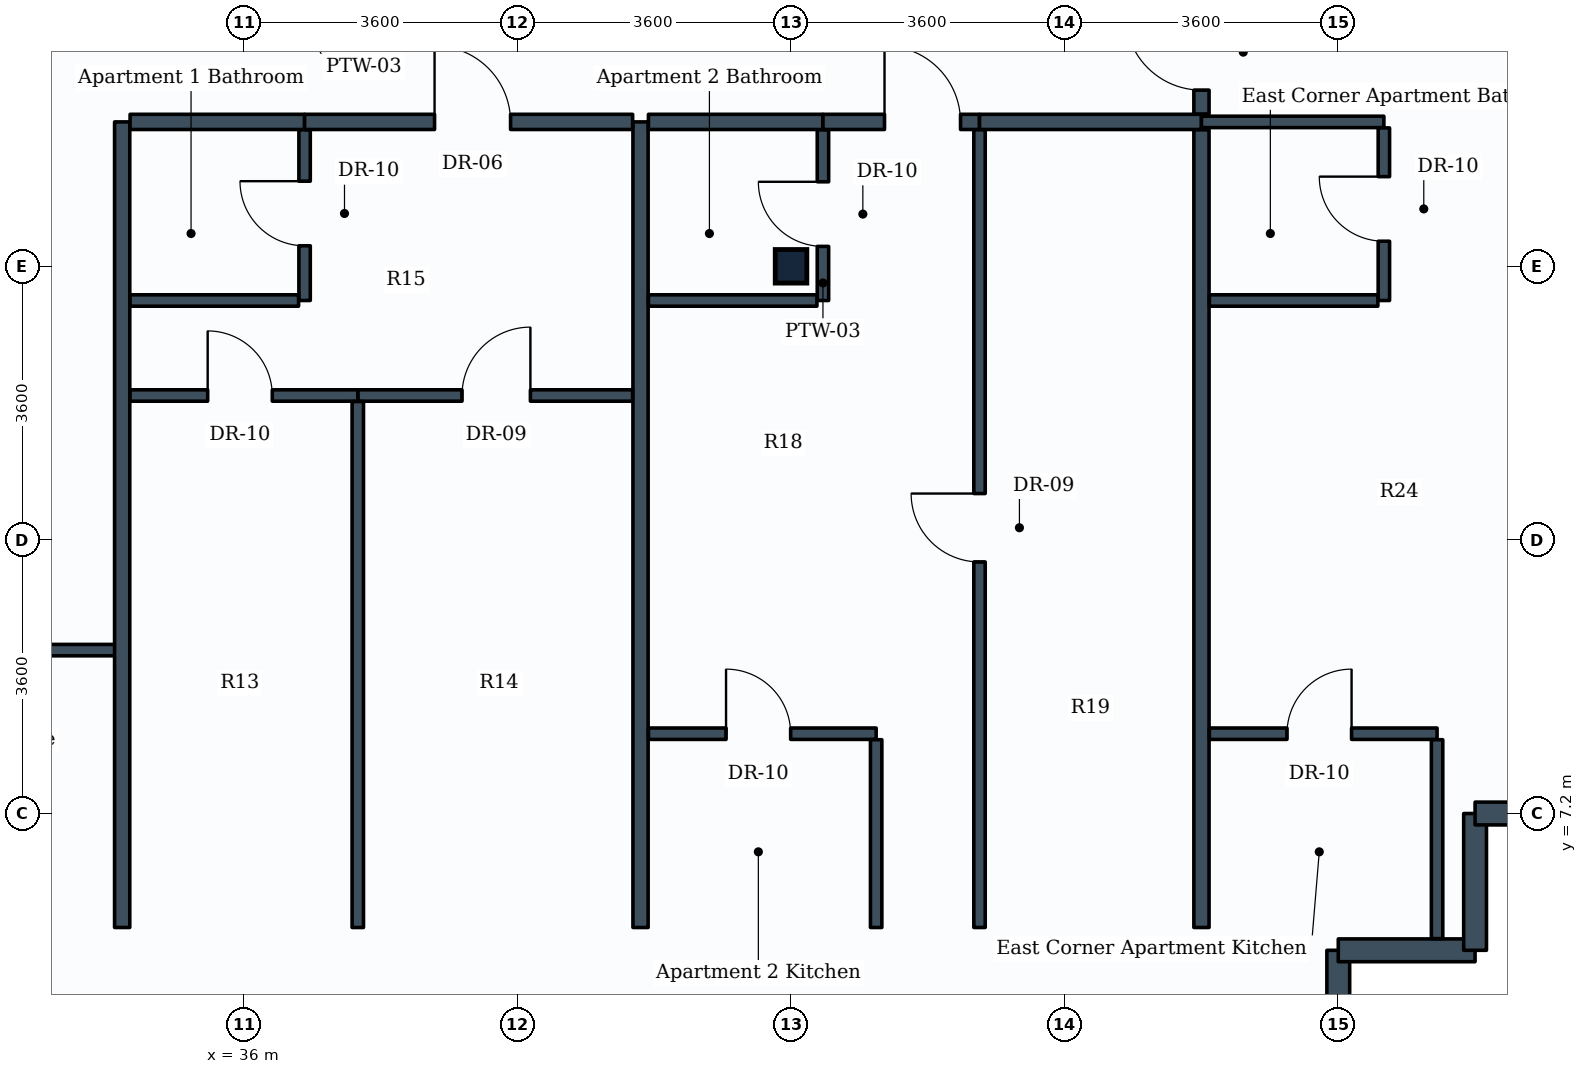
"""IFC4 building model, lengths in metres.
Left out: names, types, materials, properties, quantities, classifications, styles, units other than length and angle.
Written with IfcOpenShell. Run it as: python <this file> out.ifc"""

import sys

from ifc_helpers import new_model, si_unit, direction, frame, frame_2d, origin, origin_2d, place, context, subcontext, project, spatial, rectangle, i_section, extrude, element, fill, save


model = new_model("IFC4")
c1 = context("Model", 3, precision=1e-05, world=origin(), true_north=direction((0.0, 1.0)))
c2 = subcontext(c1, "Body", "Model", "MODEL_VIEW")
j1 = project(units=[si_unit("LENGTHUNIT", "METRE"), si_unit("PLANEANGLEUNIT", "RADIAN")], contexts=[c1])
p1 = place(None, origin())
s1 = spatial("IfcSite", under=j1, at=p1, CompositionType="ELEMENT")
p2 = place(p1, origin())
s2 = spatial("IfcBuilding", under=s1, at=p2, CompositionType="ELEMENT")
p3 = place(p2, frame((0.0, 0.0, 131.4)))
s3 = spatial("IfcBuildingStorey", under=s2, at=p3, CompositionType="ELEMENT", Elevation=131.4)
p4 = place(p3, frame((43.2, 14.4, 0.0), z_axis=(0.0, 0.0, 1.0), x_axis=(1.0, 0.0, 0.0)))
e1 = element("IfcColumn", 1, at=p4, inside=s3, PredefinedType="COLUMN", context=c2, shape_type="SweptSolid", body=[
    extrude(i_section(OverallWidth=0.416, OverallDepth=0.442, WebThickness=0.025, FlangeThickness=0.041, FilletRadius=0.015, at=origin_2d()), origin(), (0.0, 0.0, 1.0), 3.8),
])
p5 = place(p3, frame((50.4, 5.4, 0.0), z_axis=(0.0, 0.0, 1.0), x_axis=(0.0, -1.0, 0.0)))
e2 = element("IfcWall", 2, at=p5, inside=s3, PredefinedType="STANDARD", context=c2, shape_type="SweptSolid", body=[
    extrude(rectangle(XDim=1.8, YDim=0.3, at=frame_2d((0.9, 0.0))), origin(), (0.0, 0.0, 1.0), 2.93),
])
for number, where, z_axis, x_axis in (
    (3, (52.2, 5.4, 0.0), (0.0, 0.0, 1.0), (-1.0, 0.0, 0.0)),
    (4, (52.2, 7.2, 0.0), (0.0, 0.0, 1.0), (0.0, -1.0, 0.0)),
):
    element("IfcWall", number, at=place(p3, frame(where, z_axis=z_axis, x_axis=x_axis)), inside=s3, PredefinedType="STANDARD", context=c2, shape_type="SweptSolid", body=[
        extrude(rectangle(XDim=1.8, YDim=0.3, at=frame_2d((0.9, 0.0))), origin(), (0.0, 0.0, 1.0), 3.535),
    ])
p6 = place(p3, frame((54.0, 7.2, 0.0), z_axis=(0.0, 0.0, 1.0), x_axis=(-1.0, 0.0, 0.0)))
e5 = element("IfcWall", 5, at=p6, inside=s3, PredefinedType="STANDARD", context=c2, shape_type="SweptSolid", body=[
    extrude(rectangle(XDim=1.8, YDim=0.3, at=frame_2d((0.9, 0.0))), origin(), (0.0, 0.0, 1.0), 2.93),
])
p7 = place(p3, frame((28.879, 9.35, 0.0), z_axis=(0.0, 0.0, 1.0), x_axis=(1.0, 0.0, 0.0)))
e6 = element("IfcWall", 6, at=p7, inside=s3, PredefinedType="PARTITIONING", context=c2, shape_type="SweptSolid", body=[
    extrude(rectangle(XDim=5.521, YDim=0.15, at=frame_2d((2.76, 0.0))), origin(), (0.0, 0.0, 1.0), 3.535),
])
p8 = place(p7, frame((0.36, 0.0, 0.0)))
e7 = element("IfcOpeningElement", 7, at=p8, cuts=e6, PredefinedType="OPENING", context=c2, shape_type="SweptSolid", body=[
    extrude(rectangle(XDim=1.0, YDim=2.1, at=frame_2d((0.5, 1.05))), frame((0.0, 0.085, 0.0), z_axis=(0.0, -1.0, 0.0), x_axis=(1.0, 0.0, 0.0)), (0.0, 0.0, 1.0), 0.17),
])
p9 = place(p3, frame((34.4, 5.7, 0.0), z_axis=(0.0, 0.0, 1.0), x_axis=(0.0, 1.0, 0.0)))
e8 = element("IfcWall", 8, at=p9, inside=s3, PredefinedType="PARTITIONING", context=c2, shape_type="SweptSolid", body=[
    extrude(rectangle(XDim=10.6, YDim=0.2, at=frame_2d((5.3, 0.0))), origin(), (0.0, 0.0, 1.0), 3.17),
])
p10 = place(p3, frame((41.22, 5.7, 0.0), z_axis=(0.0, 0.0, 1.0), x_axis=(0.0, 1.0, 0.0)))
e9 = element("IfcWall", 9, at=p10, inside=s3, PredefinedType="PARTITIONING", context=c2, shape_type="SweptSolid", body=[
    extrude(rectangle(XDim=10.6, YDim=0.2, at=frame_2d((5.3, 0.0))), origin(), (0.0, 0.0, 1.0), 3.13),
])
p11 = place(p3, frame((34.504, 16.3, 0.0), z_axis=(0.0, 0.0, 1.0), x_axis=(1.0, 0.0, 0.0)))
e10 = element("IfcWall", 10, at=p11, inside=s3, PredefinedType="PARTITIONING", context=c2, shape_type="SweptSolid", body=[
    extrude(rectangle(XDim=2.296, YDim=0.2, at=frame_2d((1.148, 0.0))), origin(), (0.0, 0.0, 1.0), 3.22),
])
p12 = place(p3, frame((36.8, 13.95, 0.0), z_axis=(0.0, 0.0, 1.0), x_axis=(0.0, 1.0, 0.0)))
e11 = element("IfcWall", 11, at=p12, inside=s3, PredefinedType="PARTITIONING", context=c2, shape_type="SweptSolid", body=[
    extrude(rectangle(XDim=2.246, YDim=0.15, at=frame_2d((1.123, 0.0))), origin(), (0.0, 0.0, 1.0), 3.17),
])
p13 = place(p12, frame((0.72, 0.0, 0.0)))
e12 = element("IfcOpeningElement", 12, at=p13, cuts=e11, PredefinedType="OPENING", context=c2, shape_type="SweptSolid", body=[
    extrude(rectangle(XDim=0.85, YDim=2.1, at=frame_2d((0.425, 1.05))), frame((0.0, 0.085, 0.0), z_axis=(0.0, -1.0, 0.0), x_axis=(1.0, 0.0, 0.0)), (0.0, 0.0, 1.0), 0.17),
])
p14 = place(p3, frame((34.504, 13.95, 0.0), z_axis=(0.0, 0.0, 1.0), x_axis=(1.0, 0.0, 0.0)))
e13 = element("IfcWall", 13, at=p14, inside=s3, PredefinedType="PARTITIONING", context=c2, shape_type="SweptSolid", body=[
    extrude(rectangle(XDim=2.217, YDim=0.15, at=frame_2d((1.108, 0.0))), origin(), (0.0, 0.0, 1.0), 3.22),
])
p15 = place(p3, frame((36.8, 16.3, 0.0), z_axis=(0.0, 0.0, 1.0), x_axis=(1.0, 0.0, 0.0)))
e14 = element("IfcWall", 14, at=p15, inside=s3, PredefinedType="PARTITIONING", context=c2, shape_type="SweptSolid", body=[
    extrude(rectangle(XDim=4.316, YDim=0.2, at=frame_2d((2.158, 0.0))), origin(), (0.0, 0.0, 1.0), 3.17),
])
p16 = place(p15, frame((1.71, 0.0, 0.0)))
e15 = element("IfcOpeningElement", 15, at=p16, cuts=e14, PredefinedType="OPENING", context=c2, shape_type="SweptSolid", body=[
    extrude(rectangle(XDim=1.0, YDim=2.1, at=frame_2d((0.5, 1.05))), frame((0.0, 0.11, 0.0), z_axis=(0.0, -1.0, 0.0), x_axis=(1.0, 0.0, 0.0)), (0.0, 0.0, 1.0), 0.22),
])
p17 = place(p3, frame((37.5, 12.7, 0.0), z_axis=(0.0, 0.0, 1.0), x_axis=(1.0, 0.0, 0.0)))
e16 = element("IfcWall", 16, at=p17, inside=s3, PredefinedType="PARTITIONING", context=c2, shape_type="SweptSolid", body=[
    extrude(rectangle(XDim=3.616, YDim=0.15, at=frame_2d((1.808, 0.0))), origin(), (0.0, 0.0, 1.0), 3.17),
])
p18 = place(p17, frame((1.371, 0.0, 0.0)))
e17 = element("IfcOpeningElement", 17, at=p18, cuts=e16, PredefinedType="OPENING", context=c2, shape_type="SweptSolid", body=[
    extrude(rectangle(XDim=0.9, YDim=2.1, at=frame_2d((0.45, 1.05))), frame((0.0, 0.085, 0.0), z_axis=(0.0, -1.0, 0.0), x_axis=(1.0, 0.0, 0.0)), (0.0, 0.0, 1.0), 0.17),
])
p19 = place(p3, frame((34.504, 12.7, 0.0), z_axis=(0.0, 0.0, 1.0), x_axis=(1.0, 0.0, 0.0)))
e18 = element("IfcWall", 18, at=p19, inside=s3, PredefinedType="PARTITIONING", context=c2, shape_type="SweptSolid", body=[
    extrude(rectangle(XDim=2.996, YDim=0.15, at=frame_2d((1.498, 0.0))), origin(), (0.0, 0.0, 1.0), 3.22),
])
p20 = place(p19, frame((1.021, 0.0, 0.0)))
e19 = element("IfcOpeningElement", 19, at=p20, cuts=e18, PredefinedType="OPENING", context=c2, shape_type="SweptSolid", body=[
    extrude(rectangle(XDim=0.85, YDim=2.1, at=frame_2d((0.425, 1.05))), frame((0.0, 0.085, 0.0), z_axis=(0.0, -1.0, 0.0), x_axis=(1.0, 0.0, 0.0)), (0.0, 0.0, 1.0), 0.17),
])
p21 = place(p3, frame((37.5, 5.7, 0.0), z_axis=(0.0, 0.0, 1.0), x_axis=(0.0, 1.0, 0.0)))
e20 = element("IfcWall", 20, at=p21, inside=s3, PredefinedType="PARTITIONING", context=c2, shape_type="SweptSolid", body=[
    extrude(rectangle(XDim=6.921, YDim=0.15, at=frame_2d((3.46, 0.0))), origin(), (0.0, 0.0, 1.0), 3.08),
])
p22 = place(p3, frame((41.324, 16.3, 0.0), z_axis=(0.0, 0.0, 1.0), x_axis=(1.0, 0.0, 0.0)))
e21 = element("IfcWall", 21, at=p22, inside=s3, PredefinedType="PARTITIONING", context=c2, shape_type="SweptSolid", body=[
    extrude(rectangle(XDim=2.296, YDim=0.2, at=frame_2d((1.148, 0.0))), origin(), (0.0, 0.0, 1.0), 3.18),
])
p23 = place(p3, frame((43.62, 13.95, 0.0), z_axis=(0.0, 0.0, 1.0), x_axis=(0.0, 1.0, 0.0)))
e22 = element("IfcWall", 22, at=p23, inside=s3, PredefinedType="PARTITIONING", context=c2, shape_type="SweptSolid", body=[
    extrude(rectangle(XDim=2.246, YDim=0.15, at=frame_2d((1.123, 0.0))), origin(), (0.0, 0.0, 1.0), 3.17),
])
p24 = place(p23, frame((0.712, 0.0, 0.0)))
e23 = element("IfcOpeningElement", 23, at=p24, cuts=e22, PredefinedType="OPENING", context=c2, shape_type="SweptSolid", body=[
    extrude(rectangle(XDim=0.85, YDim=2.1, at=frame_2d((0.425, 1.05))), frame((0.0, 0.085, 0.0), z_axis=(0.0, -1.0, 0.0), x_axis=(1.0, 0.0, 0.0)), (0.0, 0.0, 1.0), 0.17),
])
p25 = place(p3, frame((41.324, 13.95, 0.0), z_axis=(0.0, 0.0, 1.0), x_axis=(1.0, 0.0, 0.0)))
e24 = element("IfcWall", 24, at=p25, inside=s3, PredefinedType="PARTITIONING", context=c2, shape_type="SweptSolid", body=[
    extrude(rectangle(XDim=2.217, YDim=0.15, at=frame_2d((1.108, 0.0))), origin(), (0.0, 0.0, 1.0), 3.18),
])
p26 = place(p3, frame((43.62, 16.3, 0.0), z_axis=(0.0, 0.0, 1.0), x_axis=(1.0, 0.0, 0.0)))
e25 = element("IfcWall", 25, at=p26, inside=s3, PredefinedType="PARTITIONING", context=c2, shape_type="SweptSolid", body=[
    extrude(rectangle(XDim=2.06, YDim=0.2, at=frame_2d((1.03, 0.0))), origin(), (0.0, 0.0, 1.0), 3.535),
])
p27 = place(p26, frame((0.81, 0.0, 0.0)))
e26 = element("IfcOpeningElement", 26, at=p27, cuts=e25, PredefinedType="OPENING", context=c2, shape_type="SweptSolid", body=[
    extrude(rectangle(XDim=1.0, YDim=2.1, at=frame_2d((0.5, 1.05))), frame((0.0, 0.11, 0.0), z_axis=(0.0, -1.0, 0.0), x_axis=(1.0, 0.0, 0.0)), (0.0, 0.0, 1.0), 0.22),
])
p28 = place(p3, frame((45.68, 16.3, 0.0), z_axis=(0.0, 0.0, 1.0), x_axis=(1.0, 0.0, 0.0)))
e27 = element("IfcWall", 27, at=p28, inside=s3, PredefinedType="PARTITIONING", context=c2, shape_type="SweptSolid", body=[
    extrude(rectangle(XDim=2.92, YDim=0.2, at=frame_2d((1.46, 0.0))), origin(), (0.0, 0.0, 1.0), 3.17),
])
p29 = place(p3, frame((45.68, 5.7, 0.0), z_axis=(0.0, 0.0, 1.0), x_axis=(0.0, 1.0, 0.0)))
e28 = element("IfcWall", 28, at=p29, inside=s3, PredefinedType="PARTITIONING", context=c2, shape_type="SweptSolid", body=[
    extrude(rectangle(XDim=10.496, YDim=0.15, at=frame_2d((5.248, 0.0))), origin(), (0.0, 0.0, 1.0), 3.17),
])
p30 = place(p29, frame((4.81, 0.0, 0.0)))
e29 = element("IfcOpeningElement", 29, at=p30, cuts=e28, PredefinedType="OPENING", context=c2, shape_type="SweptSolid", body=[
    extrude(rectangle(XDim=0.9, YDim=2.1, at=frame_2d((0.45, 1.05))), frame((0.0, 0.085, 0.0), z_axis=(0.0, -1.0, 0.0), x_axis=(1.0, 0.0, 0.0)), (0.0, 0.0, 1.0), 0.17),
])
p31 = place(p3, frame((41.324, 8.25, 0.0), z_axis=(0.0, 0.0, 1.0), x_axis=(1.0, 0.0, 0.0)))
e30 = element("IfcWall", 30, at=p31, inside=s3, PredefinedType="PARTITIONING", context=c2, shape_type="SweptSolid", body=[
    extrude(rectangle(XDim=2.996, YDim=0.15, at=frame_2d((1.498, 0.0))), origin(), (0.0, 0.0, 1.0), 3.18),
])
p32 = place(p31, frame((1.021, 0.0, 0.0)))
e31 = element("IfcOpeningElement", 31, at=p32, cuts=e30, PredefinedType="OPENING", context=c2, shape_type="SweptSolid", body=[
    extrude(rectangle(XDim=0.85, YDim=2.1, at=frame_2d((0.425, 1.05))), frame((0.0, 0.085, 0.0), z_axis=(0.0, -1.0, 0.0), x_axis=(1.0, 0.0, 0.0)), (0.0, 0.0, 1.0), 0.17),
])
p33 = place(p3, frame((44.32, 5.7, 0.0), z_axis=(0.0, 0.0, 1.0), x_axis=(0.0, 1.0, 0.0)))
e32 = element("IfcWall", 32, at=p33, inside=s3, PredefinedType="PARTITIONING", context=c2, shape_type="SweptSolid", body=[
    extrude(rectangle(XDim=2.471, YDim=0.15, at=frame_2d((1.235, 0.0))), origin(), (0.0, 0.0, 1.0), 3.17),
])
p34 = place(p3, frame((48.6, 5.7, 0.0), z_axis=(0.0, 0.0, 1.0), x_axis=(0.0, 1.0, 0.0)))
e33 = element("IfcWall", 33, at=p34, inside=s3, PredefinedType="PARTITIONING", context=c2, shape_type="SweptSolid", body=[
    extrude(rectangle(XDim=10.496, YDim=0.2, at=frame_2d((5.248, 0.0))), origin(), (0.0, 0.0, 1.0), 3.17),
])
p35 = place(p3, frame((48.6, 16.404, 0.0), z_axis=(0.0, 0.0, 1.0), x_axis=(0.0, 1.0, 0.0)))
e34 = element("IfcWall", 34, at=p35, inside=s3, PredefinedType="PARTITIONING", context=c2, shape_type="SweptSolid", body=[
    extrude(rectangle(XDim=1.667, YDim=0.2, at=frame_2d((0.833, 0.0))), origin(), (0.0, 0.0, 1.0), 3.535),
])
p36 = place(p35, frame((0.314, 0.0, 0.0)))
e35 = element("IfcOpeningElement", 35, at=p36, cuts=e34, PredefinedType="OPENING", context=c2, shape_type="SweptSolid", body=[
    extrude(rectangle(XDim=1.0, YDim=2.1, at=frame_2d((0.5, 1.05))), frame((0.0, 0.11, 0.0), z_axis=(0.0, -1.0, 0.0), x_axis=(1.0, 0.0, 0.0)), (0.0, 0.0, 1.0), 0.22),
])
p37 = place(p3, frame((48.6, 16.3, 0.0), z_axis=(0.0, 0.0, 1.0), x_axis=(1.0, 0.0, 0.0)))
e36 = element("IfcWall", 36, at=p37, inside=s3, PredefinedType="PARTITIONING", context=c2, shape_type="SweptSolid", body=[
    extrude(rectangle(XDim=2.4, YDim=0.15, at=frame_2d((1.2, 0.0))), origin(), (0.0, 0.0, 1.0), 3.535),
])
p38 = place(p3, frame((51.0, 13.95, 0.0), z_axis=(0.0, 0.0, 1.0), x_axis=(0.0, 1.0, 0.0)))
e37 = element("IfcWall", 37, at=p38, inside=s3, PredefinedType="PARTITIONING", context=c2, shape_type="SweptSolid", body=[
    extrude(rectangle(XDim=2.271, YDim=0.15, at=frame_2d((1.135, 0.0))), origin(), (0.0, 0.0, 1.0), 3.17),
])
p39 = place(p38, frame((0.78, 0.0, 0.0)))
e38 = element("IfcOpeningElement", 38, at=p39, cuts=e37, PredefinedType="OPENING", context=c2, shape_type="SweptSolid", body=[
    extrude(rectangle(XDim=0.85, YDim=2.1, at=frame_2d((0.425, 1.05))), frame((0.0, 0.085, 0.0), z_axis=(0.0, -1.0, 0.0), x_axis=(1.0, 0.0, 0.0)), (0.0, 0.0, 1.0), 0.17),
])
p40 = place(p3, frame((48.704, 13.95, 0.0), z_axis=(0.0, 0.0, 1.0), x_axis=(1.0, 0.0, 0.0)))
e39 = element("IfcWall", 39, at=p40, inside=s3, PredefinedType="PARTITIONING", context=c2, shape_type="SweptSolid", body=[
    extrude(rectangle(XDim=2.217, YDim=0.15, at=frame_2d((1.108, 0.0))), origin(), (0.0, 0.0, 1.0), 3.535),
])
p41 = place(p3, frame((48.704, 8.25, 0.0), z_axis=(0.0, 0.0, 1.0), x_axis=(1.0, 0.0, 0.0)))
e40 = element("IfcWall", 40, at=p41, inside=s3, PredefinedType="PARTITIONING", context=c2, shape_type="SweptSolid", body=[
    extrude(rectangle(XDim=2.996, YDim=0.15, at=frame_2d((1.498, 0.0))), origin(), (0.0, 0.0, 1.0), 3.535),
])
p42 = place(p41, frame((1.021, 0.0, 0.0)))
e41 = element("IfcOpeningElement", 41, at=p42, cuts=e40, PredefinedType="OPENING", context=c2, shape_type="SweptSolid", body=[
    extrude(rectangle(XDim=0.85, YDim=2.1, at=frame_2d((0.425, 1.05))), frame((0.0, 0.085, 0.0), z_axis=(0.0, -1.0, 0.0), x_axis=(1.0, 0.0, 0.0)), (0.0, 0.0, 1.0), 0.17),
])
p43 = place(p3, frame((51.7, 5.554, 0.0), z_axis=(0.0, 0.0, 1.0), x_axis=(0.0, 1.0, 0.0)))
e42 = element("IfcWall", 42, at=p43, inside=s3, PredefinedType="PARTITIONING", context=c2, shape_type="SweptSolid", body=[
    extrude(rectangle(XDim=2.617, YDim=0.15, at=frame_2d((1.309, 0.0))), origin(), (0.0, 0.0, 1.0), 3.535),
])
p44 = place(p13, origin())
e43 = element("IfcDoor", 43, at=p44, inside=s3, OperationType="SINGLE_SWING_RIGHT", PredefinedType="DOOR", context=c2, shape_type="SweptSolid", body=[
    extrude(rectangle(XDim=0.85, YDim=2.1, at=frame_2d((0.425, 1.05))), frame((0.0, 0.025, 0.0), z_axis=(0.0, -1.0, 0.0), x_axis=(1.0, 0.0, 0.0)), (0.0, 0.0, 1.0), 0.05),
])
fill(e12, e43)
p45 = place(p16, origin())
e44 = element("IfcDoor", 44, at=p45, inside=s3, OperationType="SINGLE_SWING_LEFT", PredefinedType="DOOR", context=c2, shape_type="SweptSolid", body=[
    extrude(rectangle(XDim=1.0, YDim=2.1, at=frame_2d((0.5, 1.05))), frame((0.0, 0.025, 0.0), z_axis=(0.0, -1.0, 0.0), x_axis=(1.0, 0.0, 0.0)), (0.0, 0.0, 1.0), 0.05),
])
fill(e15, e44)
p46 = place(p18, origin())
e45 = element("IfcDoor", 45, at=p46, inside=s3, OperationType="SINGLE_SWING_RIGHT", PredefinedType="DOOR", context=c2, shape_type="SweptSolid", body=[
    extrude(rectangle(XDim=0.9, YDim=2.1, at=frame_2d((0.45, 1.05))), frame((0.0, 0.025, 0.0), z_axis=(0.0, -1.0, 0.0), x_axis=(1.0, 0.0, 0.0)), (0.0, 0.0, 1.0), 0.05),
])
fill(e17, e45)
p47 = place(p20, origin())
e46 = element("IfcDoor", 46, at=p47, inside=s3, OperationType="SINGLE_SWING_LEFT", PredefinedType="DOOR", context=c2, shape_type="SweptSolid", body=[
    extrude(rectangle(XDim=0.85, YDim=2.1, at=frame_2d((0.425, 1.05))), frame((0.0, 0.025, 0.0), z_axis=(0.0, -1.0, 0.0), x_axis=(1.0, 0.0, 0.0)), (0.0, 0.0, 1.0), 0.05),
])
fill(e19, e46)
p48 = place(p24, origin())
e47 = element("IfcDoor", 47, at=p48, inside=s3, OperationType="SINGLE_SWING_RIGHT", PredefinedType="DOOR", context=c2, shape_type="SweptSolid", body=[
    extrude(rectangle(XDim=0.85, YDim=2.1, at=frame_2d((0.425, 1.05))), frame((0.0, 0.025, 0.0), z_axis=(0.0, -1.0, 0.0), x_axis=(1.0, 0.0, 0.0)), (0.0, 0.0, 1.0), 0.05),
])
fill(e23, e47)
p49 = place(p27, origin())
e48 = element("IfcDoor", 48, at=p49, inside=s3, OperationType="SINGLE_SWING_LEFT", PredefinedType="DOOR", context=c2, shape_type="SweptSolid", body=[
    extrude(rectangle(XDim=1.0, YDim=2.1, at=frame_2d((0.5, 1.05))), frame((0.0, 0.025, 0.0), z_axis=(0.0, -1.0, 0.0), x_axis=(1.0, 0.0, 0.0)), (0.0, 0.0, 1.0), 0.05),
])
fill(e26, e48)
p50 = place(p30, origin())
e49 = element("IfcDoor", 49, at=p50, inside=s3, OperationType="SINGLE_SWING_RIGHT", PredefinedType="DOOR", context=c2, shape_type="SweptSolid", body=[
    extrude(rectangle(XDim=0.9, YDim=2.1, at=frame_2d((0.45, 1.05))), frame((0.0, 0.025, 0.0), z_axis=(0.0, -1.0, 0.0), x_axis=(1.0, 0.0, 0.0)), (0.0, 0.0, 1.0), 0.05),
])
fill(e29, e49)
p51 = place(p32, origin())
e50 = element("IfcDoor", 50, at=p51, inside=s3, OperationType="SINGLE_SWING_LEFT", PredefinedType="DOOR", context=c2, shape_type="SweptSolid", body=[
    extrude(rectangle(XDim=0.85, YDim=2.1, at=frame_2d((0.425, 1.05))), frame((0.0, 0.025, 0.0), z_axis=(0.0, -1.0, 0.0), x_axis=(1.0, 0.0, 0.0)), (0.0, 0.0, 1.0), 0.05),
])
fill(e31, e50)
p52 = place(p36, origin())
e51 = element("IfcDoor", 51, at=p52, inside=s3, OperationType="SINGLE_SWING_RIGHT", PredefinedType="DOOR", context=c2, shape_type="SweptSolid", body=[
    extrude(rectangle(XDim=1.0, YDim=2.1, at=frame_2d((0.5, 1.05))), frame((0.0, 0.025, 0.0), z_axis=(0.0, -1.0, 0.0), x_axis=(1.0, 0.0, 0.0)), (0.0, 0.0, 1.0), 0.05),
])
fill(e35, e51)
p53 = place(p39, origin())
e52 = element("IfcDoor", 52, at=p53, inside=s3, OperationType="SINGLE_SWING_RIGHT", PredefinedType="DOOR", context=c2, shape_type="SweptSolid", body=[
    extrude(rectangle(XDim=0.85, YDim=2.1, at=frame_2d((0.425, 1.05))), frame((0.0, 0.025, 0.0), z_axis=(0.0, -1.0, 0.0), x_axis=(1.0, 0.0, 0.0)), (0.0, 0.0, 1.0), 0.05),
])
fill(e38, e52)
p54 = place(p42, origin())
e53 = element("IfcDoor", 53, at=p54, inside=s3, OperationType="SINGLE_SWING_RIGHT", PredefinedType="DOOR", context=c2, shape_type="SweptSolid", body=[
    extrude(rectangle(XDim=0.85, YDim=2.1, at=frame_2d((0.425, 1.05))), frame((0.0, 0.025, 0.0), z_axis=(0.0, -1.0, 0.0), x_axis=(1.0, 0.0, 0.0)), (0.0, 0.0, 1.0), 0.05),
])
fill(e41, e53)
save(model, sys.argv[1])
